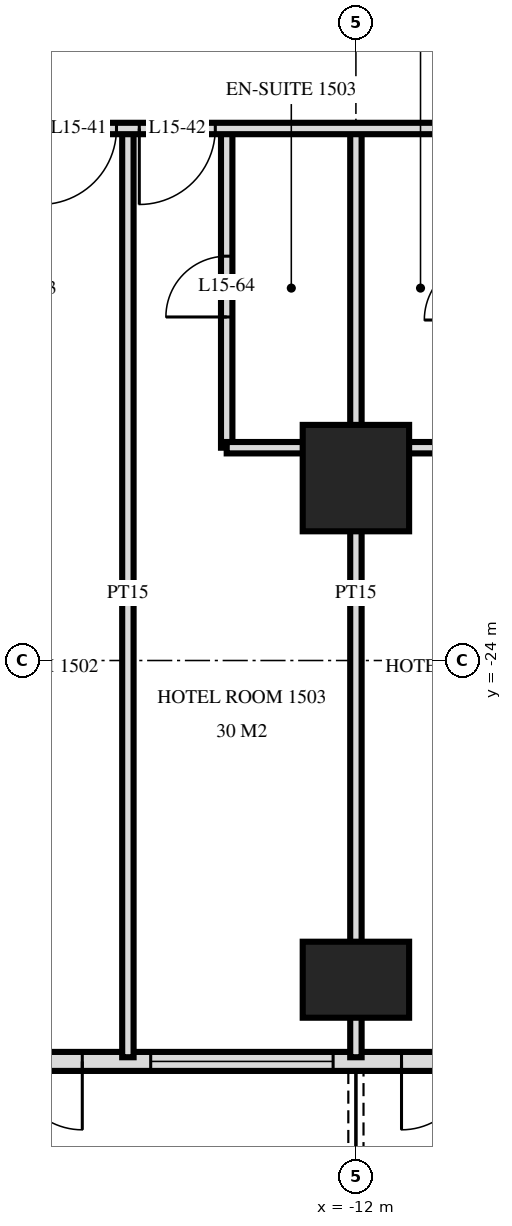
"""IFC4 building model, lengths in metres.
Left out: names, types, materials, properties, quantities, classifications, styles, units other than length and angle.
Written with IfcOpenShell. Run it as: python <this file> out.ifc"""

import sys

from ifc_helpers import new_model, si_unit, direction, frame, frame_2d, origin, origin_2d, place, context, subcontext, project, spatial, rectangle, extrude, element, fill, save


model = new_model("IFC4")
c1 = context("Model", 3, precision=1e-05, world=origin(), true_north=direction((0.0, 1.0)))
c2 = subcontext(c1, "Body", "Model", "MODEL_VIEW")
j1 = project(units=[si_unit("LENGTHUNIT", "METRE"), si_unit("PLANEANGLEUNIT", "RADIAN")], contexts=[c1])
p1 = place(None, origin())
s1 = spatial("IfcSite", under=j1, at=p1, CompositionType="ELEMENT")
p2 = place(p1, origin())
s2 = spatial("IfcBuilding", under=s1, at=p2, CompositionType="ELEMENT")
p3 = place(p2, frame((0.0, 0.0, 63.6)))
s3 = spatial("IfcBuildingStorey", under=s2, at=p3, CompositionType="ELEMENT", Elevation=63.6)
p4 = place(p3, frame((-12.0, -28.2, 0.0), z_axis=(0.0, 0.0, 1.0), x_axis=(1.0, 0.0, 0.0)))
e1 = element("IfcColumn", 1, at=p4, inside=s3, PredefinedType="COLUMN", context=c2, shape_type="SweptSolid", body=[
    extrude(rectangle(XDim=1.4, YDim=1.0, at=origin_2d()), origin(), (0.0, 0.0, 1.0), 3.6),
])
p5 = place(p3, frame((-12.0, -21.6, 0.0), z_axis=(0.0, 0.0, 1.0), x_axis=(1.0, 0.0, 0.0)))
e2 = element("IfcColumn", 2, at=p5, inside=s3, PredefinedType="COLUMN", context=c2, shape_type="SweptSolid", body=[
    extrude(rectangle(XDim=1.4, YDim=1.4, at=origin_2d()), origin(), (0.0, 0.0, 1.0), 3.6),
])
p6 = place(p3, frame((-28.775, -29.275, 0.0), z_axis=(0.0, 0.0, 1.0), x_axis=(1.0, 0.0, 0.0)))
e3 = element("IfcWall", 3, at=p6, inside=s3, PredefinedType="SOLIDWALL", context=c2, shape_type="SweptSolid", body=[
    extrude(rectangle(XDim=57.551, YDim=0.25, at=frame_2d((28.775, 0.0))), origin(), (0.0, 0.0, 1.0), 3.32),
])
p7 = place(p6, frame((0.575, 0.0, 0.0)))
e4 = element("IfcOpeningElement", 4, at=p7, cuts=e3, PredefinedType="OPENING", context=c2, shape_type="SweptSolid", body=[
    extrude(rectangle(XDim=1.8, YDim=2.4, at=frame_2d((0.9, 1.2))), frame((0.0, 0.135, 0.0), z_axis=(0.0, -1.0, 0.0), x_axis=(1.0, 0.0, 0.0)), (0.0, 0.0, 1.0), 0.27),
])
p8 = place(p6, frame((5.375, 0.0, 0.0)))
e5 = element("IfcOpeningElement", 5, at=p8, cuts=e3, PredefinedType="OPENING", context=c2, shape_type="SweptSolid", body=[
    extrude(rectangle(XDim=1.8, YDim=2.4, at=frame_2d((0.9, 1.2))), frame((0.0, 0.135, 0.0), z_axis=(0.0, -1.0, 0.0), x_axis=(1.0, 0.0, 0.0)), (0.0, 0.0, 1.0), 0.27),
])
p9 = place(p6, frame((8.075, 0.0, 0.3)))
e6 = element("IfcOpeningElement", 6, at=p9, cuts=e3, PredefinedType="OPENING", context=c2, shape_type="SweptSolid", body=[
    extrude(rectangle(XDim=2.4, YDim=2.1, at=frame_2d((1.2, 1.05))), frame((0.0, 0.135, 0.0), z_axis=(0.0, -1.0, 0.0), x_axis=(1.0, 0.0, 0.0)), (0.0, 0.0, 1.0), 0.27),
])
p10 = place(p6, frame((11.375, 0.0, 0.0)))
e7 = element("IfcOpeningElement", 7, at=p10, cuts=e3, PredefinedType="OPENING", context=c2, shape_type="SweptSolid", body=[
    extrude(rectangle(XDim=1.8, YDim=2.4, at=frame_2d((0.9, 1.2))), frame((0.0, 0.135, 0.0), z_axis=(0.0, -1.0, 0.0), x_axis=(1.0, 0.0, 0.0)), (0.0, 0.0, 1.0), 0.27),
])
p11 = place(p6, frame((14.075, 0.0, 0.3)))
e8 = element("IfcOpeningElement", 8, at=p11, cuts=e3, PredefinedType="OPENING", context=c2, shape_type="SweptSolid", body=[
    extrude(rectangle(XDim=2.4, YDim=2.1, at=frame_2d((1.2, 1.05))), frame((0.0, 0.135, 0.0), z_axis=(0.0, -1.0, 0.0), x_axis=(1.0, 0.0, 0.0)), (0.0, 0.0, 1.0), 0.27),
])
p12 = place(p6, frame((17.375, 0.0, 0.0)))
e9 = element("IfcOpeningElement", 9, at=p12, cuts=e3, PredefinedType="OPENING", context=c2, shape_type="SweptSolid", body=[
    extrude(rectangle(XDim=1.8, YDim=2.4, at=frame_2d((0.9, 1.2))), frame((0.0, 0.135, 0.0), z_axis=(0.0, -1.0, 0.0), x_axis=(1.0, 0.0, 0.0)), (0.0, 0.0, 1.0), 0.27),
])
p13 = place(p6, frame((20.075, 0.0, 0.3)))
e10 = element("IfcOpeningElement", 10, at=p13, cuts=e3, PredefinedType="OPENING", context=c2, shape_type="SweptSolid", body=[
    extrude(rectangle(XDim=2.4, YDim=2.1, at=frame_2d((1.2, 1.05))), frame((0.0, 0.135, 0.0), z_axis=(0.0, -1.0, 0.0), x_axis=(1.0, 0.0, 0.0)), (0.0, 0.0, 1.0), 0.27),
])
p14 = place(p6, frame((23.075, 0.0, 0.3)))
e11 = element("IfcOpeningElement", 11, at=p14, cuts=e3, PredefinedType="OPENING", context=c2, shape_type="SweptSolid", body=[
    extrude(rectangle(XDim=2.4, YDim=2.1, at=frame_2d((1.2, 1.05))), frame((0.0, 0.135, 0.0), z_axis=(0.0, -1.0, 0.0), x_axis=(1.0, 0.0, 0.0)), (0.0, 0.0, 1.0), 0.27),
])
p15 = place(p6, frame((26.375, 0.0, 0.0)))
e12 = element("IfcOpeningElement", 12, at=p15, cuts=e3, PredefinedType="OPENING", context=c2, shape_type="SweptSolid", body=[
    extrude(rectangle(XDim=1.8, YDim=2.4, at=frame_2d((0.9, 1.2))), frame((0.0, 0.135, 0.0), z_axis=(0.0, -1.0, 0.0), x_axis=(1.0, 0.0, 0.0)), (0.0, 0.0, 1.0), 0.27),
])
p16 = place(p6, frame((29.075, 0.0, 0.3)))
e13 = element("IfcOpeningElement", 13, at=p16, cuts=e3, PredefinedType="OPENING", context=c2, shape_type="SweptSolid", body=[
    extrude(rectangle(XDim=2.4, YDim=2.1, at=frame_2d((1.2, 1.05))), frame((0.0, 0.135, 0.0), z_axis=(0.0, -1.0, 0.0), x_axis=(1.0, 0.0, 0.0)), (0.0, 0.0, 1.0), 0.27),
])
p17 = place(p6, frame((32.375, 0.0, 0.0)))
e14 = element("IfcOpeningElement", 14, at=p17, cuts=e3, PredefinedType="OPENING", context=c2, shape_type="SweptSolid", body=[
    extrude(rectangle(XDim=1.8, YDim=2.4, at=frame_2d((0.9, 1.2))), frame((0.0, 0.135, 0.0), z_axis=(0.0, -1.0, 0.0), x_axis=(1.0, 0.0, 0.0)), (0.0, 0.0, 1.0), 0.27),
])
p18 = place(p6, frame((35.375, 0.0, 0.0)))
e15 = element("IfcOpeningElement", 15, at=p18, cuts=e3, PredefinedType="OPENING", context=c2, shape_type="SweptSolid", body=[
    extrude(rectangle(XDim=1.8, YDim=2.4, at=frame_2d((0.9, 1.2))), frame((0.0, 0.135, 0.0), z_axis=(0.0, -1.0, 0.0), x_axis=(1.0, 0.0, 0.0)), (0.0, 0.0, 1.0), 0.27),
])
p19 = place(p6, frame((38.075, 0.0, 0.3)))
e16 = element("IfcOpeningElement", 16, at=p19, cuts=e3, PredefinedType="OPENING", context=c2, shape_type="SweptSolid", body=[
    extrude(rectangle(XDim=2.4, YDim=2.1, at=frame_2d((1.2, 1.05))), frame((0.0, 0.135, 0.0), z_axis=(0.0, -1.0, 0.0), x_axis=(1.0, 0.0, 0.0)), (0.0, 0.0, 1.0), 0.27),
])
p20 = place(p6, frame((41.375, 0.0, 0.0)))
e17 = element("IfcOpeningElement", 17, at=p20, cuts=e3, PredefinedType="OPENING", context=c2, shape_type="SweptSolid", body=[
    extrude(rectangle(XDim=1.8, YDim=2.4, at=frame_2d((0.9, 1.2))), frame((0.0, 0.135, 0.0), z_axis=(0.0, -1.0, 0.0), x_axis=(1.0, 0.0, 0.0)), (0.0, 0.0, 1.0), 0.27),
])
p21 = place(p6, frame((44.075, 0.0, 0.3)))
e18 = element("IfcOpeningElement", 18, at=p21, cuts=e3, PredefinedType="OPENING", context=c2, shape_type="SweptSolid", body=[
    extrude(rectangle(XDim=2.4, YDim=2.1, at=frame_2d((1.2, 1.05))), frame((0.0, 0.135, 0.0), z_axis=(0.0, -1.0, 0.0), x_axis=(1.0, 0.0, 0.0)), (0.0, 0.0, 1.0), 0.27),
])
p22 = place(p6, frame((47.075, 0.0, 0.3)))
e19 = element("IfcOpeningElement", 19, at=p22, cuts=e3, PredefinedType="OPENING", context=c2, shape_type="SweptSolid", body=[
    extrude(rectangle(XDim=2.4, YDim=2.1, at=frame_2d((1.2, 1.05))), frame((0.0, 0.135, 0.0), z_axis=(0.0, -1.0, 0.0), x_axis=(1.0, 0.0, 0.0)), (0.0, 0.0, 1.0), 0.27),
])
p23 = place(p6, frame((50.375, 0.0, 0.0)))
e20 = element("IfcOpeningElement", 20, at=p23, cuts=e3, PredefinedType="OPENING", context=c2, shape_type="SweptSolid", body=[
    extrude(rectangle(XDim=1.8, YDim=2.4, at=frame_2d((0.9, 1.2))), frame((0.0, 0.135, 0.0), z_axis=(0.0, -1.0, 0.0), x_axis=(1.0, 0.0, 0.0)), (0.0, 0.0, 1.0), 0.27),
])
p24 = place(p6, frame((53.375, 0.0, 0.0)))
e21 = element("IfcOpeningElement", 21, at=p24, cuts=e3, PredefinedType="OPENING", context=c2, shape_type="SweptSolid", body=[
    extrude(rectangle(XDim=1.8, YDim=2.4, at=frame_2d((0.9, 1.2))), frame((0.0, 0.135, 0.0), z_axis=(0.0, -1.0, 0.0), x_axis=(1.0, 0.0, 0.0)), (0.0, 0.0, 1.0), 0.27),
])
p25 = place(p3, frame((-12.0, -29.22, 0.0), z_axis=(0.0, 0.0, 1.0), x_axis=(0.0, 1.0, 0.0)))
e22 = element("IfcWall", 22, at=p25, inside=s3, PredefinedType="PARTITIONING", context=c2, shape_type="SweptSolid", body=[
    extrude(rectangle(XDim=12.22, YDim=0.15, at=frame_2d((6.11, 0.0))), origin(), (0.0, 0.0, 1.0), 3.32),
])
p26 = place(p3, frame((-13.7, -21.2, 0.0), z_axis=(0.0, 0.0, 1.0), x_axis=(0.0, 1.0, 0.0)))
e23 = element("IfcWall", 23, at=p26, inside=s3, PredefinedType="PARTITIONING", context=c2, shape_type="SweptSolid", body=[
    extrude(rectangle(XDim=4.2, YDim=0.15, at=frame_2d((2.1, 0.0))), origin(), (0.0, 0.0, 1.0), 3.32),
])
p27 = place(p26, frame((1.72, 0.0, 0.0)))
e24 = element("IfcOpeningElement", 24, at=p27, cuts=e23, PredefinedType="OPENING", context=c2, shape_type="SweptSolid", body=[
    extrude(rectangle(XDim=0.8, YDim=2.1, at=frame_2d((0.4, 1.05))), frame((0.0, 0.085, 0.0), z_axis=(0.0, -1.0, 0.0), x_axis=(1.0, 0.0, 0.0)), (0.0, 0.0, 1.0), 0.17),
])
p28 = place(p3, frame((-15.0, -29.22, 0.0), z_axis=(0.0, 0.0, 1.0), x_axis=(0.0, 1.0, 0.0)))
e25 = element("IfcWall", 25, at=p28, inside=s3, PredefinedType="PARTITIONING", context=c2, shape_type="SweptSolid", body=[
    extrude(rectangle(XDim=12.22, YDim=0.15, at=frame_2d((6.11, 0.0))), origin(), (0.0, 0.0, 1.0), 3.32),
])
p29 = place(p3, frame((-13.7, -21.2, 0.0), z_axis=(0.0, 0.0, 1.0), x_axis=(1.0, 0.0, 0.0)))
e26 = element("IfcWall", 26, at=p29, inside=s3, PredefinedType="PARTITIONING", context=c2, shape_type="SweptSolid", body=[
    extrude(rectangle(XDim=3.4, YDim=0.15, at=frame_2d((1.7, 0.0))), origin(), (0.0, 0.0, 1.0), 3.32),
])
p30 = place(p3, frame((-33.12, -17.0, 0.0), z_axis=(0.0, 0.0, 1.0), x_axis=(1.0, 0.0, 0.0)))
e27 = element("IfcWall", 27, at=p30, inside=s3, PredefinedType="PARTITIONING", context=c2, shape_type="SweptSolid", body=[
    extrude(rectangle(XDim=66.24, YDim=0.15, at=frame_2d((33.12, 0.0))), origin(), (0.0, 0.0, 1.0), 3.32),
])
p31 = place(p30, frame((12.27, 0.0, 0.0)))
e28 = element("IfcOpeningElement", 28, at=p31, cuts=e27, PredefinedType="OPENING", context=c2, shape_type="SweptSolid", body=[
    extrude(rectangle(XDim=1.0, YDim=2.1, at=frame_2d((0.5, 1.05))), frame((0.0, 0.085, 0.0), z_axis=(0.0, -1.0, 0.0), x_axis=(1.0, 0.0, 0.0)), (0.0, 0.0, 1.0), 0.17),
])
p32 = place(p30, frame((16.97, 0.0, 0.0)))
e29 = element("IfcOpeningElement", 29, at=p32, cuts=e27, PredefinedType="OPENING", context=c2, shape_type="SweptSolid", body=[
    extrude(rectangle(XDim=1.0, YDim=2.1, at=frame_2d((0.5, 1.05))), frame((0.0, 0.085, 0.0), z_axis=(0.0, -1.0, 0.0), x_axis=(1.0, 0.0, 0.0)), (0.0, 0.0, 1.0), 0.17),
])
p33 = place(p30, frame((18.27, 0.0, 0.0)))
e30 = element("IfcOpeningElement", 30, at=p33, cuts=e27, PredefinedType="OPENING", context=c2, shape_type="SweptSolid", body=[
    extrude(rectangle(XDim=1.0, YDim=2.1, at=frame_2d((0.5, 1.05))), frame((0.0, 0.085, 0.0), z_axis=(0.0, -1.0, 0.0), x_axis=(1.0, 0.0, 0.0)), (0.0, 0.0, 1.0), 0.17),
])
p34 = place(p30, frame((22.97, 0.0, 0.0)))
e31 = element("IfcOpeningElement", 31, at=p34, cuts=e27, PredefinedType="OPENING", context=c2, shape_type="SweptSolid", body=[
    extrude(rectangle(XDim=1.0, YDim=2.1, at=frame_2d((0.5, 1.05))), frame((0.0, 0.085, 0.0), z_axis=(0.0, -1.0, 0.0), x_axis=(1.0, 0.0, 0.0)), (0.0, 0.0, 1.0), 0.17),
])
p35 = place(p30, frame((24.27, 0.0, 0.0)))
e32 = element("IfcOpeningElement", 32, at=p35, cuts=e27, PredefinedType="OPENING", context=c2, shape_type="SweptSolid", body=[
    extrude(rectangle(XDim=1.0, YDim=2.1, at=frame_2d((0.5, 1.05))), frame((0.0, 0.085, 0.0), z_axis=(0.0, -1.0, 0.0), x_axis=(1.0, 0.0, 0.0)), (0.0, 0.0, 1.0), 0.17),
])
p36 = place(p30, frame((28.97, 0.0, 0.0)))
e33 = element("IfcOpeningElement", 33, at=p36, cuts=e27, PredefinedType="OPENING", context=c2, shape_type="SweptSolid", body=[
    extrude(rectangle(XDim=1.0, YDim=2.1, at=frame_2d((0.5, 1.05))), frame((0.0, 0.085, 0.0), z_axis=(0.0, -1.0, 0.0), x_axis=(1.0, 0.0, 0.0)), (0.0, 0.0, 1.0), 0.17),
])
p37 = place(p30, frame((30.27, 0.0, 0.0)))
e34 = element("IfcOpeningElement", 34, at=p37, cuts=e27, PredefinedType="OPENING", context=c2, shape_type="SweptSolid", body=[
    extrude(rectangle(XDim=1.0, YDim=2.1, at=frame_2d((0.5, 1.05))), frame((0.0, 0.085, 0.0), z_axis=(0.0, -1.0, 0.0), x_axis=(1.0, 0.0, 0.0)), (0.0, 0.0, 1.0), 0.17),
])
p38 = place(p30, frame((33.82, 0.0, 0.0)))
e35 = element("IfcOpeningElement", 35, at=p38, cuts=e27, PredefinedType="OPENING", context=c2, shape_type="SweptSolid", body=[
    extrude(rectangle(XDim=1.0, YDim=2.1, at=frame_2d((0.5, 1.05))), frame((0.0, 0.085, 0.0), z_axis=(0.0, -1.0, 0.0), x_axis=(1.0, 0.0, 0.0)), (0.0, 0.0, 1.0), 0.17),
])
p39 = place(p30, frame((46.27, 0.0, 0.0)))
e36 = element("IfcOpeningElement", 36, at=p39, cuts=e27, PredefinedType="OPENING", context=c2, shape_type="SweptSolid", body=[
    extrude(rectangle(XDim=1.0, YDim=2.1, at=frame_2d((0.5, 1.05))), frame((0.0, 0.085, 0.0), z_axis=(0.0, -1.0, 0.0), x_axis=(1.0, 0.0, 0.0)), (0.0, 0.0, 1.0), 0.17),
])
p40 = place(p30, frame((52.97, 0.0, 0.0)))
e37 = element("IfcOpeningElement", 37, at=p40, cuts=e27, PredefinedType="OPENING", context=c2, shape_type="SweptSolid", body=[
    extrude(rectangle(XDim=1.0, YDim=2.1, at=frame_2d((0.5, 1.05))), frame((0.0, 0.085, 0.0), z_axis=(0.0, -1.0, 0.0), x_axis=(1.0, 0.0, 0.0)), (0.0, 0.0, 1.0), 0.17),
])
p41 = place(p30, frame((6.05, 0.0, 0.0)))
e38 = element("IfcOpeningElement", 38, at=p41, cuts=e27, PredefinedType="OPENING", context=c2, shape_type="SweptSolid", body=[
    extrude(rectangle(XDim=1.0, YDim=2.1, at=frame_2d((0.5, 1.05))), frame((0.0, 0.085, 0.0), z_axis=(0.0, -1.0, 0.0), x_axis=(1.0, 0.0, 0.0)), (0.0, 0.0, 1.0), 0.17),
])
p42 = place(p30, frame((59.15, 0.0, 0.0)))
e39 = element("IfcOpeningElement", 39, at=p42, cuts=e27, PredefinedType="OPENING", context=c2, shape_type="SweptSolid", body=[
    extrude(rectangle(XDim=1.0, YDim=2.1, at=frame_2d((0.5, 1.05))), frame((0.0, 0.085, 0.0), z_axis=(0.0, -1.0, 0.0), x_axis=(1.0, 0.0, 0.0)), (0.0, 0.0, 1.0), 0.17),
])
p43 = place(p10, frame((0.9, 0.0, 0.0), z_axis=(0.0, 0.0, 1.0), x_axis=(-1.0, 0.0, 0.0)))
e40 = element("IfcDoor", 40, at=p43, inside=s3, OperationType="DOUBLE_DOOR_SINGLE_SWING", PredefinedType="DOOR", context=c2, shape_type="SweptSolid", body=[
    extrude(rectangle(XDim=1.8, YDim=2.4, at=frame_2d((0.0, 1.2))), frame((0.0, -0.025, 0.0), z_axis=(0.0, 1.0, 0.0), x_axis=(-1.0, 0.0, 0.0)), (0.0, 0.0, 1.0), 0.05),
])
fill(e7, e40)
p44 = place(p11, origin())
e41 = element("IfcWindow", 41, at=p44, inside=s3, PartitioningType="SINGLE_PANEL", PredefinedType="WINDOW", context=c2, shape_type="SweptSolid", body=[
    extrude(rectangle(XDim=2.4, YDim=2.1, at=frame_2d((1.2, 1.05))), frame((0.0, 0.03, 0.0), z_axis=(0.0, -1.0, 0.0), x_axis=(1.0, 0.0, 0.0)), (0.0, 0.0, 1.0), 0.06),
])
fill(e8, e41)
p45 = place(p12, frame((0.9, 0.0, 0.0), z_axis=(0.0, 0.0, 1.0), x_axis=(-1.0, 0.0, 0.0)))
e42 = element("IfcDoor", 42, at=p45, inside=s3, OperationType="DOUBLE_DOOR_SINGLE_SWING", PredefinedType="DOOR", context=c2, shape_type="SweptSolid", body=[
    extrude(rectangle(XDim=1.8, YDim=2.4, at=frame_2d((0.0, 1.2))), frame((0.0, -0.025, 0.0), z_axis=(0.0, 1.0, 0.0), x_axis=(-1.0, 0.0, 0.0)), (0.0, 0.0, 1.0), 0.05),
])
fill(e9, e42)
p46 = place(p32, frame((0.5, 0.0, 0.0), z_axis=(0.0, 0.0, 1.0), x_axis=(-1.0, 0.0, 0.0)))
e43 = element("IfcDoor", 43, at=p46, inside=s3, OperationType="SINGLE_SWING_LEFT", PredefinedType="DOOR", context=c2, shape_type="SweptSolid", body=[
    extrude(rectangle(XDim=1.0, YDim=2.1, at=frame_2d((0.0, 1.05))), frame((0.0, -0.025, 0.0), z_axis=(0.0, 1.0, 0.0), x_axis=(-1.0, 0.0, 0.0)), (0.0, 0.0, 1.0), 0.05),
])
fill(e29, e43)
p47 = place(p33, frame((0.5, 0.0, 0.0), z_axis=(0.0, 0.0, 1.0), x_axis=(-1.0, 0.0, 0.0)))
e44 = element("IfcDoor", 44, at=p47, inside=s3, OperationType="SINGLE_SWING_LEFT", PredefinedType="DOOR", context=c2, shape_type="SweptSolid", body=[
    extrude(rectangle(XDim=1.0, YDim=2.1, at=frame_2d((0.0, 1.05))), frame((0.0, -0.025, 0.0), z_axis=(0.0, 1.0, 0.0), x_axis=(-1.0, 0.0, 0.0)), (0.0, 0.0, 1.0), 0.05),
])
fill(e30, e44)
p48 = place(p27, origin())
e45 = element("IfcDoor", 45, at=p48, inside=s3, OperationType="SINGLE_SWING_RIGHT", PredefinedType="DOOR", context=c2, shape_type="SweptSolid", body=[
    extrude(rectangle(XDim=0.8, YDim=2.1, at=frame_2d((0.4, 1.05))), frame((0.0, 0.025, 0.0), z_axis=(0.0, -1.0, 0.0), x_axis=(1.0, 0.0, 0.0)), (0.0, 0.0, 1.0), 0.05),
])
fill(e24, e45)
save(model, sys.argv[1])
